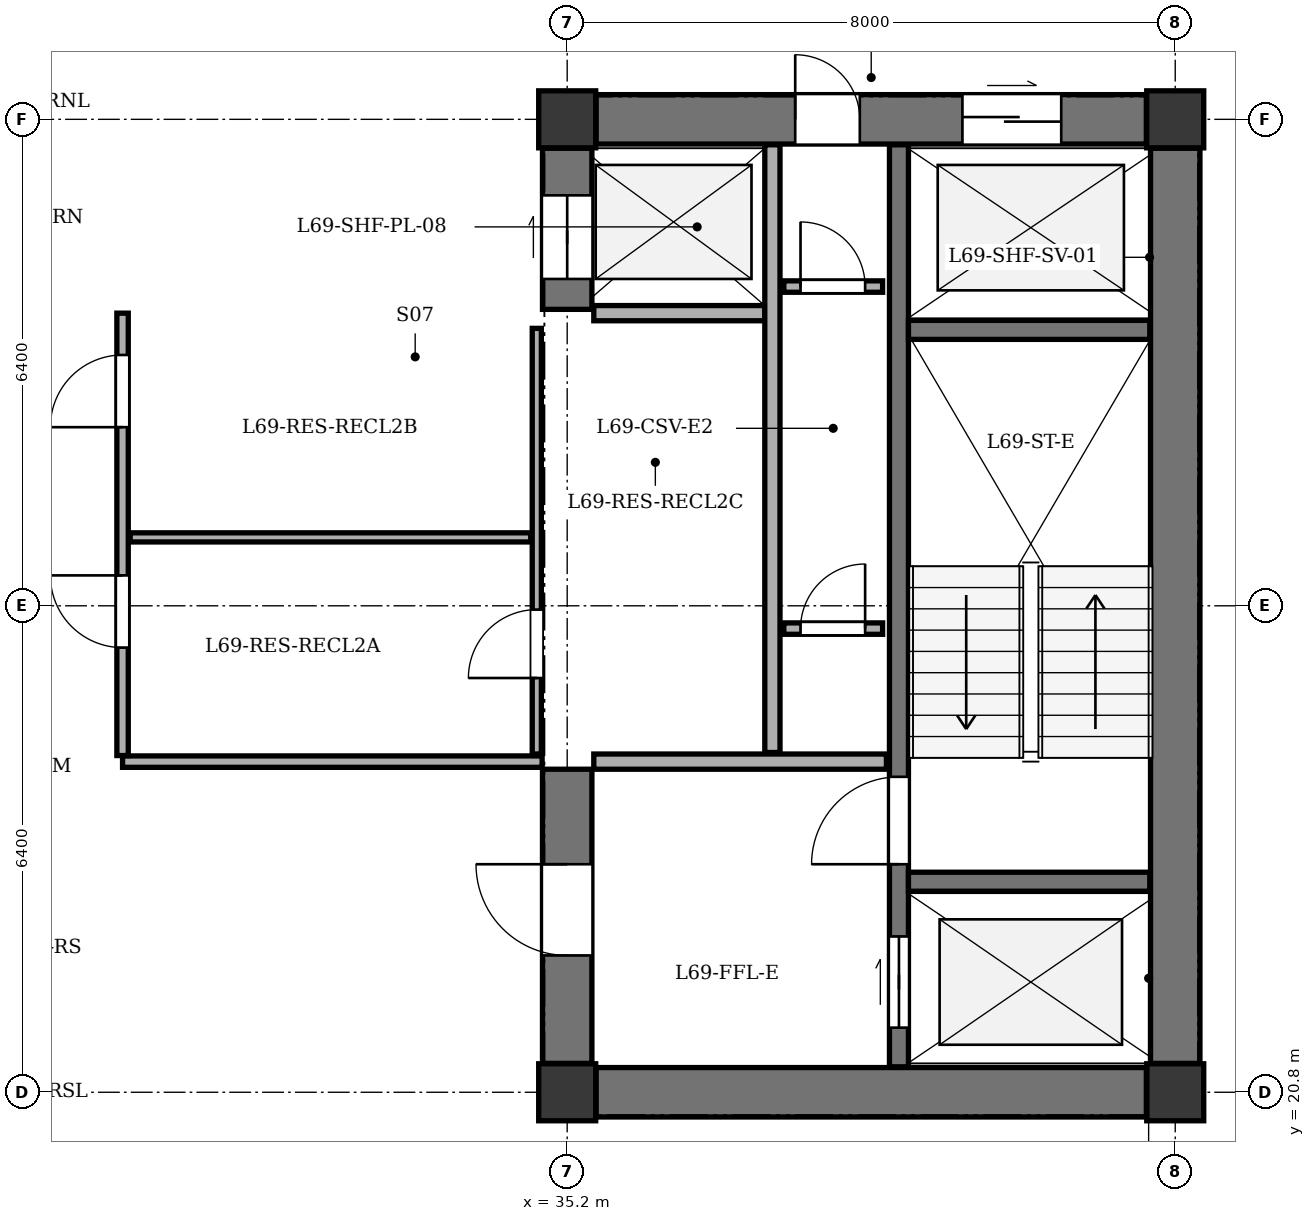
"""IFC4 building model, lengths in metres.
Left out: names, types, materials, properties, quantities, classifications, styles, units other than length and angle.
Written with IfcOpenShell. Run it as: python <this file> out.ifc"""

import sys

from ifc_helpers import new_model, si_unit, direction, frame, frame_2d, origin, origin_2d, place, context, subcontext, project, spatial, rectangle, extrude, element, fill, save


model = new_model("IFC4")
c1 = context("Model", 3, precision=1e-05, world=origin(), true_north=direction((0.0, 1.0)))
c2 = subcontext(c1, "Body", "Model", "MODEL_VIEW")
j1 = project(units=[si_unit("LENGTHUNIT", "METRE"), si_unit("PLANEANGLEUNIT", "RADIAN")], contexts=[c1])
p1 = place(None, origin())
s1 = spatial("IfcSite", under=j1, at=p1, CompositionType="ELEMENT")
p2 = place(p1, origin())
s2 = spatial("IfcBuilding", under=s1, at=p2, CompositionType="ELEMENT")
p3 = place(p2, frame((0.0, 0.0, 261.9)))
s3 = spatial("IfcBuildingStorey", under=s2, at=p3, CompositionType="ELEMENT", Elevation=261.9)
for number, where, z_axis, x_axis in (
    (1, (35.2, 20.8, 0.0), (0.0, 0.0, 1.0), (1.0, 0.0, 0.0)),
    (2, (43.2, 20.8, 0.0), (0.0, 0.0, 1.0), (1.0, 0.0, 0.0)),
    (3, (35.2, 33.6, 0.0), (0.0, 0.0, 1.0), (1.0, 0.0, 0.0)),
    (4, (43.2, 33.6, 0.0), (0.0, 0.0, 1.0), (1.0, 0.0, 0.0)),
):
    element("IfcColumn", number, at=place(p3, frame(where, z_axis=z_axis, x_axis=x_axis)), inside=s3, PredefinedType="COLUMN", context=c2, shape_type="SweptSolid", body=[
        extrude(rectangle(XDim=0.75, YDim=0.75, at=origin_2d()), origin(), (0.0, 0.0, 1.0), 3.4),
    ])
p4 = place(p3, frame((43.2, 21.18, 0.0), z_axis=(0.0, 0.0, 1.0), x_axis=(0.0, 1.0, 0.0)))
e5 = element("IfcWall", 5, at=p4, inside=s3, PredefinedType="SHEAR", context=c2, shape_type="SweptSolid", body=[
    extrude(rectangle(XDim=12.04, YDim=0.65, at=frame_2d((6.02, 0.0))), origin(), (0.0, 0.0, 1.0), 3.1),
])
p5 = place(p3, frame((35.58, 20.8, 0.0), z_axis=(0.0, 0.0, 1.0), x_axis=(1.0, 0.0, 0.0)))
e6 = element("IfcWall", 6, at=p5, inside=s3, PredefinedType="SHEAR", context=c2, shape_type="SweptSolid", body=[
    extrude(rectangle(XDim=7.24, YDim=0.65, at=frame_2d((3.62, 0.0))), origin(), (0.0, 0.0, 1.0), 3.1),
])
p6 = place(p3, frame((35.58, 33.6, 0.0), z_axis=(0.0, 0.0, 1.0), x_axis=(1.0, 0.0, 0.0)))
e7 = element("IfcWall", 7, at=p6, inside=s3, PredefinedType="SHEAR", context=c2, shape_type="SweptSolid", body=[
    extrude(rectangle(XDim=7.24, YDim=0.65, at=frame_2d((3.62, 0.0))), origin(), (0.0, 0.0, 1.0), 3.1),
])
p7 = place(p6, frame((4.82, 0.0, 0.0)))
e8 = element("IfcOpeningElement", 8, at=p7, cuts=e7, PredefinedType="OPENING", context=c2, shape_type="SweptSolid", body=[
    extrude(rectangle(XDim=1.3, YDim=2.15, at=frame_2d((0.65, 1.075))), frame((0.0, 0.335, 0.0), z_axis=(0.0, -1.0, 0.0), x_axis=(1.0, 0.0, 0.0)), (0.0, 0.0, 1.0), 0.67),
])
p8 = place(p6, frame((2.62, 0.0, 0.0)))
e9 = element("IfcOpeningElement", 9, at=p8, cuts=e7, PredefinedType="OPENING", context=c2, shape_type="SweptSolid", body=[
    extrude(rectangle(XDim=0.85, YDim=2.02, at=frame_2d((0.425, 1.01))), frame((0.0, 0.335, 0.0), z_axis=(0.0, -1.0, 0.0), x_axis=(1.0, 0.0, 0.0)), (0.0, 0.0, 1.0), 0.67),
])
p9 = place(p3, frame((35.2, 21.18, 0.0), z_axis=(0.0, 0.0, 1.0), x_axis=(0.0, 1.0, 0.0)))
e10 = element("IfcWall", 10, at=p9, inside=s3, PredefinedType="SHEAR", context=c2, shape_type="SweptSolid", body=[
    extrude(rectangle(XDim=3.87, YDim=0.65, at=frame_2d((1.935, 0.0))), origin(), (0.0, 0.0, 1.0), 3.1),
])
p10 = place(p9, frame((1.42, 0.0, 0.0)))
e11 = element("IfcOpeningElement", 11, at=p10, cuts=e10, PredefinedType="OPENING", context=c2, shape_type="SweptSolid", body=[
    extrude(rectangle(XDim=1.2, YDim=2.15, at=frame_2d((0.6, 1.075))), frame((0.0, 0.335, 0.0), z_axis=(0.0, -1.0, 0.0), x_axis=(1.0, 0.0, 0.0)), (0.0, 0.0, 1.0), 0.67),
])
p11 = place(p3, frame((35.2, 31.1, 0.0), z_axis=(0.0, 0.0, 1.0), x_axis=(0.0, 1.0, 0.0)))
e12 = element("IfcWall", 12, at=p11, inside=s3, PredefinedType="SHEAR", context=c2, shape_type="SweptSolid", body=[
    extrude(rectangle(XDim=2.12, YDim=0.65, at=frame_2d((1.06, 0.0))), origin(), (0.0, 0.0, 1.0), 3.1),
])
p12 = place(p11, frame((0.4, 0.0, 0.0)))
e13 = element("IfcOpeningElement", 13, at=p12, cuts=e12, PredefinedType="OPENING", context=c2, shape_type="SweptSolid", body=[
    extrude(rectangle(XDim=1.1, YDim=2.1, at=frame_2d((0.55, 1.05))), frame((0.0, 0.335, 0.0), z_axis=(0.0, -1.0, 0.0), x_axis=(1.0, 0.0, 0.0)), (0.0, 0.0, 1.0), 0.67),
])
p13 = place(p3, frame((39.565, 21.135, 0.0), z_axis=(0.0, 0.0, 1.0), x_axis=(0.0, 1.0, 0.0)))
e14 = element("IfcWall", 14, at=p13, inside=s3, PredefinedType="SHEAR", context=c2, shape_type="SweptSolid", body=[
    extrude(rectangle(XDim=12.13, YDim=0.25, at=frame_2d((6.065, 0.0))), origin(), (0.0, 0.0, 1.0), 3.1),
])
p14 = place(p13, frame((0.515, 0.0, 0.0)))
e15 = element("IfcOpeningElement", 15, at=p14, cuts=e14, PredefinedType="OPENING", context=c2, shape_type="SweptSolid", body=[
    extrude(rectangle(XDim=1.2, YDim=2.15, at=frame_2d((0.6, 1.075))), frame((0.0, 0.135, 0.0), z_axis=(0.0, -1.0, 0.0), x_axis=(1.0, 0.0, 0.0)), (0.0, 0.0, 1.0), 0.27),
])
p15 = place(p13, frame((2.665, 0.0, 0.0)))
e16 = element("IfcOpeningElement", 16, at=p15, cuts=e14, PredefinedType="OPENING", context=c2, shape_type="SweptSolid", body=[
    extrude(rectangle(XDim=1.15, YDim=2.15, at=frame_2d((0.575, 1.075))), frame((0.0, 0.135, 0.0), z_axis=(0.0, -1.0, 0.0), x_axis=(1.0, 0.0, 0.0)), (0.0, 0.0, 1.0), 0.27),
])
for number, where, z_axis, x_axis in (
    (17, (39.69, 23.57, 0.0), (0.0, 0.0, 1.0), (1.0, 0.0, 0.0)),
    (18, (39.69, 30.83, 0.0), (0.0, 0.0, 1.0), (1.0, 0.0, 0.0)),
):
    element("IfcWall", number, at=place(p3, frame(where, z_axis=z_axis, x_axis=x_axis)), inside=s3, PredefinedType="SHEAR", context=c2, shape_type="SweptSolid", body=[
        extrude(rectangle(XDim=3.175, YDim=0.25, at=frame_2d((1.587, 0.0))), origin(), (0.0, 0.0, 1.0), 3.1),
    ])
p16 = place(p3, frame((35.55, 25.15, 0.0), z_axis=(0.0, 0.0, 1.0), x_axis=(1.0, 0.0, 0.0)))
e19 = element("IfcWall", 19, at=p16, inside=s3, PredefinedType="SOLIDWALL", context=c2, shape_type="SweptSolid", body=[
    extrude(rectangle(XDim=3.85, YDim=0.2, at=frame_2d((1.925, 0.0))), origin(), (0.0, 0.0, 1.0), 3.1),
])
p17 = place(p3, frame((35.55, 31.05, 0.0), z_axis=(0.0, 0.0, 1.0), x_axis=(1.0, 0.0, 0.0)))
e20 = element("IfcWall", 20, at=p17, inside=s3, PredefinedType="SOLIDWALL", context=c2, shape_type="SweptSolid", body=[
    extrude(rectangle(XDim=2.25, YDim=0.2, at=frame_2d((1.125, 0.0))), origin(), (0.0, 0.0, 1.0), 3.1),
])
p18 = place(p3, frame((37.9, 25.27, 0.0), z_axis=(0.0, 0.0, 1.0), x_axis=(0.0, 1.0, 0.0)))
e21 = element("IfcWall", 21, at=p18, inside=s3, PredefinedType="SOLIDWALL", context=c2, shape_type="SweptSolid", body=[
    extrude(rectangle(XDim=7.995, YDim=0.2, at=frame_2d((3.998, 0.0))), origin(), (0.0, 0.0, 1.0), 3.1),
])
p19 = place(p3, frame((38.05, 26.9, 0.0), z_axis=(0.0, 0.0, 1.0), x_axis=(1.0, 0.0, 0.0)))
e22 = element("IfcWall", 22, at=p19, inside=s3, PredefinedType="PARTITIONING", context=c2, shape_type="SweptSolid", body=[
    extrude(rectangle(XDim=1.3, YDim=0.15, at=frame_2d((0.65, 0.0))), origin(), (0.0, 0.0, 1.0), 3.1),
])
p20 = place(p19, frame((0.22, 0.0, 0.0)))
e23 = element("IfcOpeningElement", 23, at=p20, cuts=e22, PredefinedType="OPENING", context=c2, shape_type="SweptSolid", body=[
    extrude(rectangle(XDim=0.85, YDim=2.02, at=frame_2d((0.425, 1.01))), frame((0.0, 0.085, 0.0), z_axis=(0.0, -1.0, 0.0), x_axis=(1.0, 0.0, 0.0)), (0.0, 0.0, 1.0), 0.17),
])
p21 = place(p3, frame((38.05, 31.4, 0.0), z_axis=(0.0, 0.0, 1.0), x_axis=(1.0, 0.0, 0.0)))
e24 = element("IfcWall", 24, at=p21, inside=s3, PredefinedType="PARTITIONING", context=c2, shape_type="SweptSolid", body=[
    extrude(rectangle(XDim=1.3, YDim=0.15, at=frame_2d((0.65, 0.0))), origin(), (0.0, 0.0, 1.0), 3.1),
])
p22 = place(p21, frame((0.22, 0.0, 0.0)))
e25 = element("IfcOpeningElement", 25, at=p22, cuts=e24, PredefinedType="OPENING", context=c2, shape_type="SweptSolid", body=[
    extrude(rectangle(XDim=0.85, YDim=2.02, at=frame_2d((0.425, 1.01))), frame((0.0, 0.085, 0.0), z_axis=(0.0, -1.0, 0.0), x_axis=(1.0, 0.0, 0.0)), (0.0, 0.0, 1.0), 0.17),
])
p23 = place(p3, frame((29.35, 25.15, 0.0), z_axis=(0.0, 0.0, 1.0), x_axis=(1.0, 0.0, 0.0)))
e26 = element("IfcWall", 26, at=p23, inside=s3, PredefinedType="PARTITIONING", context=c2, shape_type="SweptSolid", body=[
    extrude(rectangle(XDim=5.52, YDim=0.15, at=frame_2d((2.76, 0.0))), origin(), (0.0, 0.0, 1.0), 3.1),
])
p24 = place(p3, frame((29.35, 25.23, 0.0), z_axis=(0.0, 0.0, 1.0), x_axis=(0.0, 1.0, 0.0)))
e27 = element("IfcWall", 27, at=p24, inside=s3, PredefinedType="PARTITIONING", context=c2, shape_type="SweptSolid", body=[
    extrude(rectangle(XDim=5.82, YDim=0.15, at=frame_2d((2.91, 0.0))), origin(), (0.0, 0.0, 1.0), 3.1),
])
p25 = place(p24, frame((1.42, 0.0, 0.0)))
e28 = element("IfcOpeningElement", 28, at=p25, cuts=e27, PredefinedType="OPENING", context=c2, shape_type="SweptSolid", body=[
    extrude(rectangle(XDim=0.95, YDim=2.1, at=frame_2d((0.475, 1.05))), frame((0.0, 0.085, 0.0), z_axis=(0.0, -1.0, 0.0), x_axis=(1.0, 0.0, 0.0)), (0.0, 0.0, 1.0), 0.17),
])
p26 = place(p24, frame((4.32, 0.0, 0.0)))
e29 = element("IfcOpeningElement", 29, at=p26, cuts=e27, PredefinedType="OPENING", context=c2, shape_type="SweptSolid", body=[
    extrude(rectangle(XDim=0.95, YDim=2.1, at=frame_2d((0.475, 1.05))), frame((0.0, 0.085, 0.0), z_axis=(0.0, -1.0, 0.0), x_axis=(1.0, 0.0, 0.0)), (0.0, 0.0, 1.0), 0.17),
])
p27 = place(p3, frame((34.8, 25.25, 0.0), z_axis=(0.0, 0.0, 1.0), x_axis=(0.0, 1.0, 0.0)))
e30 = element("IfcWall", 30, at=p27, inside=s3, PredefinedType="PARTITIONING", context=c2, shape_type="SweptSolid", body=[
    extrude(rectangle(XDim=5.6, YDim=0.12, at=frame_2d((2.8, 0.0))), origin(), (0.0, 0.0, 1.0), 3.1),
])
p28 = place(p27, frame((1.0, 0.0, 0.0)))
e31 = element("IfcOpeningElement", 31, at=p28, cuts=e30, PredefinedType="OPENING", context=c2, shape_type="SweptSolid", body=[
    extrude(rectangle(XDim=0.9, YDim=2.05, at=frame_2d((0.45, 1.025))), frame((0.0, 0.07, 0.0), z_axis=(0.0, -1.0, 0.0), x_axis=(1.0, 0.0, 0.0)), (0.0, 0.0, 1.0), 0.14),
])
p29 = place(p3, frame((29.45, 28.1, 0.0), z_axis=(0.0, 0.0, 1.0), x_axis=(1.0, 0.0, 0.0)))
e32 = element("IfcWall", 32, at=p29, inside=s3, PredefinedType="PARTITIONING", context=c2, shape_type="SweptSolid", body=[
    extrude(rectangle(XDim=5.27, YDim=0.12, at=frame_2d((2.635, 0.0))), origin(), (0.0, 0.0, 1.0), 3.1),
])
p30 = place(p7, origin())
e33 = element("IfcDoor", 33, at=p30, inside=s3, OperationType="DOUBLE_DOOR_SLIDING", PredefinedType="DOOR", context=c2, shape_type="SweptSolid", body=[
    extrude(rectangle(XDim=1.3, YDim=2.15, at=frame_2d((0.65, 1.075))), frame((0.0, 0.025, 0.0), z_axis=(0.0, -1.0, 0.0), x_axis=(1.0, 0.0, 0.0)), (0.0, 0.0, 1.0), 0.05),
])
fill(e8, e33)
p31 = place(p8, origin())
e34 = element("IfcDoor", 34, at=p31, inside=s3, OperationType="SINGLE_SWING_LEFT", PredefinedType="DOOR", context=c2, shape_type="SweptSolid", body=[
    extrude(rectangle(XDim=0.85, YDim=2.02, at=frame_2d((0.425, 1.01))), frame((0.0, 0.025, 0.0), z_axis=(0.0, -1.0, 0.0), x_axis=(1.0, 0.0, 0.0)), (0.0, 0.0, 1.0), 0.05),
])
fill(e9, e34)
p32 = place(p10, origin())
e35 = element("IfcDoor", 35, at=p32, inside=s3, OperationType="SINGLE_SWING_RIGHT", PredefinedType="DOOR", context=c2, shape_type="SweptSolid", body=[
    extrude(rectangle(XDim=1.2, YDim=2.15, at=frame_2d((0.6, 1.075))), frame((0.0, 0.025, 0.0), z_axis=(0.0, -1.0, 0.0), x_axis=(1.0, 0.0, 0.0)), (0.0, 0.0, 1.0), 0.05),
])
fill(e11, e35)
p33 = place(p12, origin())
e36 = element("IfcDoor", 36, at=p33, inside=s3, OperationType="DOUBLE_DOOR_SLIDING", PredefinedType="DOOR", context=c2, shape_type="SweptSolid", body=[
    extrude(rectangle(XDim=1.1, YDim=2.1, at=frame_2d((0.55, 1.05))), frame((0.0, 0.025, 0.0), z_axis=(0.0, -1.0, 0.0), x_axis=(1.0, 0.0, 0.0)), (0.0, 0.0, 1.0), 0.05),
])
fill(e13, e36)
p34 = place(p14, origin())
e37 = element("IfcDoor", 37, at=p34, inside=s3, OperationType="DOUBLE_DOOR_SLIDING", PredefinedType="DOOR", context=c2, shape_type="SweptSolid", body=[
    extrude(rectangle(XDim=1.2, YDim=2.15, at=frame_2d((0.6, 1.075))), frame((0.0, 0.025, 0.0), z_axis=(0.0, -1.0, 0.0), x_axis=(1.0, 0.0, 0.0)), (0.0, 0.0, 1.0), 0.05),
])
fill(e15, e37)
p35 = place(p15, origin())
e38 = element("IfcDoor", 38, at=p35, inside=s3, OperationType="SINGLE_SWING_LEFT", PredefinedType="DOOR", context=c2, shape_type="SweptSolid", body=[
    extrude(rectangle(XDim=1.15, YDim=2.15, at=frame_2d((0.575, 1.075))), frame((0.0, 0.025, 0.0), z_axis=(0.0, -1.0, 0.0), x_axis=(1.0, 0.0, 0.0)), (0.0, 0.0, 1.0), 0.05),
])
fill(e16, e38)
p36 = place(p20, origin())
e39 = element("IfcDoor", 39, at=p36, inside=s3, OperationType="SINGLE_SWING_RIGHT", PredefinedType="DOOR", context=c2, shape_type="SweptSolid", body=[
    extrude(rectangle(XDim=0.85, YDim=2.02, at=frame_2d((0.425, 1.01))), frame((0.0, 0.025, 0.0), z_axis=(0.0, -1.0, 0.0), x_axis=(1.0, 0.0, 0.0)), (0.0, 0.0, 1.0), 0.05),
])
fill(e23, e39)
p37 = place(p22, origin())
e40 = element("IfcDoor", 40, at=p37, inside=s3, OperationType="SINGLE_SWING_LEFT", PredefinedType="DOOR", context=c2, shape_type="SweptSolid", body=[
    extrude(rectangle(XDim=0.85, YDim=2.02, at=frame_2d((0.425, 1.01))), frame((0.0, 0.025, 0.0), z_axis=(0.0, -1.0, 0.0), x_axis=(1.0, 0.0, 0.0)), (0.0, 0.0, 1.0), 0.05),
])
fill(e25, e40)
p38 = place(p28, origin())
e41 = element("IfcDoor", 41, at=p38, inside=s3, OperationType="SINGLE_SWING_LEFT", PredefinedType="DOOR", context=c2, shape_type="SweptSolid", body=[
    extrude(rectangle(XDim=0.9, YDim=2.05, at=frame_2d((0.45, 1.025))), frame((0.0, 0.025, 0.0), z_axis=(0.0, -1.0, 0.0), x_axis=(1.0, 0.0, 0.0)), (0.0, 0.0, 1.0), 0.05),
])
fill(e31, e41)
p39 = place(p25, origin())
e42 = element("IfcDoor", 42, at=p39, inside=s3, OperationType="SINGLE_SWING_RIGHT", PredefinedType="DOOR", context=c2, shape_type="SweptSolid", body=[
    extrude(rectangle(XDim=0.95, YDim=2.1, at=frame_2d((0.475, 1.05))), frame((0.0, 0.025, 0.0), z_axis=(0.0, -1.0, 0.0), x_axis=(1.0, 0.0, 0.0)), (0.0, 0.0, 1.0), 0.05),
])
fill(e28, e42)
p40 = place(p26, origin())
e43 = element("IfcDoor", 43, at=p40, inside=s3, OperationType="SINGLE_SWING_LEFT", PredefinedType="DOOR", context=c2, shape_type="SweptSolid", body=[
    extrude(rectangle(XDim=0.95, YDim=2.1, at=frame_2d((0.475, 1.05))), frame((0.0, 0.025, 0.0), z_axis=(0.0, -1.0, 0.0), x_axis=(1.0, 0.0, 0.0)), (0.0, 0.0, 1.0), 0.05),
])
fill(e29, e43)
save(model, sys.argv[1])
